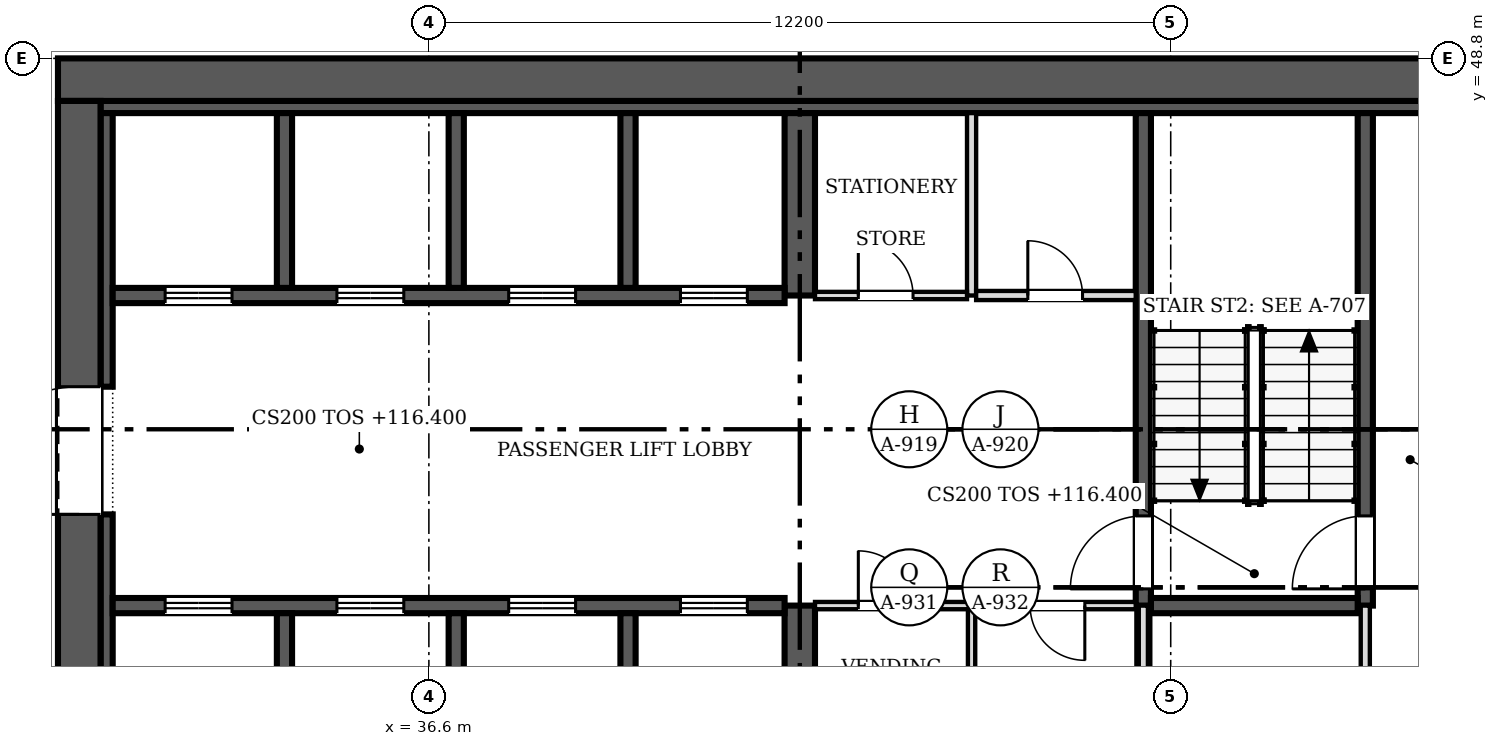
"""IFC4 building model, lengths in metres.
Left out: names, types, materials, properties, quantities, classifications, styles, units other than length and angle.
Written with IfcOpenShell. Run it as: python <this file> out.ifc"""

import sys

from ifc_helpers import new_model, si_unit, direction, frame, frame_2d, origin, place, context, subcontext, project, spatial, rectangle, extrude, source, transform, mapped, element, fill, save


model = new_model("IFC4")
c1 = context("Model", 3, precision=1e-05, world=origin(), true_north=direction((0.0, 1.0)))
c2 = subcontext(c1, "Body", "Model", "MODEL_VIEW")
j1 = project(units=[si_unit("LENGTHUNIT", "METRE"), si_unit("PLANEANGLEUNIT", "RADIAN")], contexts=[c1])
p1 = place(None, origin())
s1 = spatial("IfcSite", under=j1, at=p1, CompositionType="ELEMENT")
p2 = place(p1, origin())
s2 = spatial("IfcBuilding", under=s1, at=p2, CompositionType="ELEMENT")
p3 = place(p2, frame((0.0, 0.0, 116.4)))
s3 = spatial("IfcBuildingStorey", under=s2, at=p3, CompositionType="ELEMENT", Elevation=116.4)
p4 = place(p3, frame((30.85, 25.1, 0.0), z_axis=(0.0, 0.0, 1.0), x_axis=(0.0, 1.0, 0.0)))
e1 = element("IfcWall", 1, at=p4, inside=s3, PredefinedType="SHEAR", context=c2, shape_type="SweptSolid", body=[
    extrude(rectangle(XDim=23.0, YDim=0.7, at=frame_2d((11.5, 0.0))), origin(), (0.0, 0.0, 1.0), 3.8),
])
m1 = source(origin(), c2, "Body", "SweptSolid", [
    extrude(rectangle(XDim=2.1, YDim=2.4, at=frame_2d((1.05, 1.2))), frame((0.0, 0.36, 0.0), z_axis=(0.0, -1.0, 0.0), x_axis=(1.0, 0.0, 0.0)), (0.0, 0.0, 1.0), 0.72),
])
p5 = place(p4, frame((4.7, 0.0, 0.0)))
e2 = element("IfcOpeningElement", 2, at=p5, cuts=e1, PredefinedType="OPENING", context=c2, shape_type="MappedRepresentation", body=[
    mapped(m1, transform((0.0, 0.0, 0.0), scale=1.0)),
])
p6 = place(p4, frame((16.2, 0.0, 0.0)))
e3 = element("IfcOpeningElement", 3, at=p6, cuts=e1, PredefinedType="OPENING", context=c2, shape_type="MappedRepresentation", body=[
    mapped(m1, transform((0.0, 0.0, 0.0), scale=1.0)),
])
p7 = place(p3, frame((30.5, 48.45, 0.0), z_axis=(0.0, 0.0, 1.0), x_axis=(1.0, 0.0, 0.0)))
e4 = element("IfcWall", 4, at=p7, inside=s3, PredefinedType="SHEAR", context=c2, shape_type="SweptSolid", body=[
    extrude(rectangle(XDim=24.4, YDim=0.7, at=frame_2d((12.2, 0.0))), origin(), (0.0, 0.0, 1.0), 3.8),
])
p8 = place(p3, frame((31.2, 48.0, 0.0), z_axis=(0.0, 0.0, 1.0), x_axis=(1.0, 0.0, 0.0)))
e5 = element("IfcWall", 5, at=p8, inside=s3, PredefinedType="SOLIDWALL", context=c2, shape_type="SweptSolid", body=[
    extrude(rectangle(XDim=23.0, YDim=0.2, at=frame_2d((11.5, 0.0))), origin(), (0.0, 0.0, 1.0), 3.8),
])
p9 = place(p3, frame((31.3, 31.9, 0.0), z_axis=(0.0, 0.0, 1.0), x_axis=(0.0, 1.0, 0.0)))
e6 = element("IfcWall", 6, at=p9, inside=s3, PredefinedType="SOLIDWALL", context=c2, shape_type="SweptSolid", body=[
    extrude(rectangle(XDim=9.4, YDim=0.2, at=frame_2d((4.7, 0.0))), origin(), (0.0, 0.0, 1.0), 3.8),
])
p10 = place(p3, frame((31.3, 43.4, 0.0), z_axis=(0.0, 0.0, 1.0), x_axis=(0.0, 1.0, 0.0)))
e7 = element("IfcWall", 7, at=p10, inside=s3, PredefinedType="SOLIDWALL", context=c2, shape_type="SweptSolid", body=[
    extrude(rectangle(XDim=4.5, YDim=0.2, at=frame_2d((2.25, 0.0))), origin(), (0.0, 0.0, 1.0), 3.8),
])
p11 = place(p3, frame((42.7, 36.85, 0.0), z_axis=(0.0, 0.0, 1.0), x_axis=(0.0, 1.0, 0.0)))
e8 = element("IfcWall", 8, at=p11, inside=s3, PredefinedType="SHEAR", context=c2, shape_type="SweptSolid", body=[
    extrude(rectangle(XDim=2.95, YDim=0.5, at=frame_2d((1.475, 0.0))), origin(), (0.0, 0.0, 1.0), 3.8),
])
p12 = place(p3, frame((42.7, 44.9, 0.0), z_axis=(0.0, 0.0, 1.0), x_axis=(0.0, 1.0, 0.0)))
e9 = element("IfcWall", 9, at=p12, inside=s3, PredefinedType="SHEAR", context=c2, shape_type="SweptSolid", body=[
    extrude(rectangle(XDim=3.0, YDim=0.5, at=frame_2d((1.5, 0.0))), origin(), (0.0, 0.0, 1.0), 3.8),
])
p13 = place(p3, frame((31.4, 39.8, 0.0), z_axis=(0.0, 0.0, 1.0), x_axis=(1.0, 0.0, 0.0)))
e10 = element("IfcWall", 10, at=p13, inside=s3, PredefinedType="SOLIDWALL", context=c2, shape_type="SweptSolid", body=[
    extrude(rectangle(XDim=11.05, YDim=0.25, at=frame_2d((5.525, 0.0))), origin(), (0.0, 0.0, 1.0), 3.8),
])
m2 = source(origin(), c2, "Body", "SweptSolid", [
    extrude(rectangle(XDim=1.1, YDim=2.1, at=frame_2d((0.55, 1.05))), frame((0.0, 0.135, 0.0), z_axis=(0.0, -1.0, 0.0), x_axis=(1.0, 0.0, 0.0)), (0.0, 0.0, 1.0), 0.27),
])
p14 = place(p13, frame((0.863, 0.0, 0.0)))
e11 = element("IfcOpeningElement", 11, at=p14, cuts=e10, PredefinedType="OPENING", context=c2, shape_type="MappedRepresentation", body=[
    mapped(m2, transform((0.0, 0.0, 0.0), scale=1.0)),
])
p15 = place(p13, frame((3.688, 0.0, 0.0)))
e12 = element("IfcOpeningElement", 12, at=p15, cuts=e10, PredefinedType="OPENING", context=c2, shape_type="MappedRepresentation", body=[
    mapped(m2, transform((0.0, 0.0, 0.0), scale=1.0)),
])
p16 = place(p13, frame((6.512, 0.0, 0.0)))
e13 = element("IfcOpeningElement", 13, at=p16, cuts=e10, PredefinedType="OPENING", context=c2, shape_type="MappedRepresentation", body=[
    mapped(m2, transform((0.0, 0.0, 0.0), scale=1.0)),
])
p17 = place(p13, frame((9.337, 0.0, 0.0)))
e14 = element("IfcOpeningElement", 14, at=p17, cuts=e10, PredefinedType="OPENING", context=c2, shape_type="MappedRepresentation", body=[
    mapped(m2, transform((0.0, 0.0, 0.0), scale=1.0)),
])
p18 = place(p3, frame((42.45, 44.9, 0.0), z_axis=(0.0, 0.0, 1.0), x_axis=(-1.0, 0.0, 0.0)))
e15 = element("IfcWall", 15, at=p18, inside=s3, PredefinedType="SOLIDWALL", context=c2, shape_type="SweptSolid", body=[
    extrude(rectangle(XDim=11.05, YDim=0.25, at=frame_2d((5.525, 0.0))), origin(), (0.0, 0.0, 1.0), 3.8),
])
p19 = place(p18, frame((9.087, 0.0, 0.0)))
e16 = element("IfcOpeningElement", 16, at=p19, cuts=e15, PredefinedType="OPENING", context=c2, shape_type="MappedRepresentation", body=[
    mapped(m2, transform((0.0, 0.0, 0.0), scale=1.0)),
])
p20 = place(p18, frame((6.262, 0.0, 0.0)))
e17 = element("IfcOpeningElement", 17, at=p20, cuts=e15, PredefinedType="OPENING", context=c2, shape_type="MappedRepresentation", body=[
    mapped(m2, transform((0.0, 0.0, 0.0), scale=1.0)),
])
p21 = place(p18, frame((3.438, 0.0, 0.0)))
e18 = element("IfcOpeningElement", 18, at=p21, cuts=e15, PredefinedType="OPENING", context=c2, shape_type="MappedRepresentation", body=[
    mapped(m2, transform((0.0, 0.0, 0.0), scale=1.0)),
])
p22 = place(p18, frame((0.613, 0.0, 0.0)))
e19 = element("IfcOpeningElement", 19, at=p22, cuts=e15, PredefinedType="OPENING", context=c2, shape_type="MappedRepresentation", body=[
    mapped(m2, transform((0.0, 0.0, 0.0), scale=1.0)),
])
p23 = place(p3, frame((48.35, 47.9, 0.0), z_axis=(0.0, 0.0, 1.0), x_axis=(0.0, -1.0, 0.0)))
e20 = element("IfcWall", 20, at=p23, inside=s3, PredefinedType="SOLIDWALL", context=c2, shape_type="SweptSolid", body=[
    extrude(rectangle(XDim=8.1, YDim=0.25, at=frame_2d((4.05, 0.0))), origin(), (0.0, 0.0, 1.0), 3.8),
])
m3 = source(origin(), c2, "Body", "SweptSolid", [
    extrude(rectangle(XDim=1.2, YDim=2.1, at=frame_2d((0.6, 1.05))), frame((0.0, 0.135, 0.0), z_axis=(0.0, -1.0, 0.0), x_axis=(1.0, 0.0, 0.0)), (0.0, 0.0, 1.0), 0.27),
])
p24 = place(p23, frame((6.625, 0.0, 0.0)))
e21 = element("IfcOpeningElement", 21, at=p24, cuts=e20, PredefinedType="OPENING", context=c2, shape_type="MappedRepresentation", body=[
    mapped(m3, transform((0.0, 0.0, 0.0), scale=1.0)),
])
p25 = place(p3, frame((52.0, 39.8, 0.0), z_axis=(0.0, 0.0, 1.0), x_axis=(0.0, 1.0, 0.0)))
e22 = element("IfcWall", 22, at=p25, inside=s3, PredefinedType="SOLIDWALL", context=c2, shape_type="SweptSolid", body=[
    extrude(rectangle(XDim=8.1, YDim=0.25, at=frame_2d((4.05, 0.0))), origin(), (0.0, 0.0, 1.0), 3.8),
])
p26 = place(p25, frame((0.275, 0.0, 0.0)))
e23 = element("IfcOpeningElement", 23, at=p26, cuts=e22, PredefinedType="OPENING", context=c2, shape_type="MappedRepresentation", body=[
    mapped(m3, transform((0.0, 0.0, 0.0), scale=1.0)),
])
p27 = place(p3, frame((48.475, 39.8, 0.0), z_axis=(0.0, 0.0, 1.0), x_axis=(1.0, 0.0, 0.0)))
e24 = element("IfcWall", 24, at=p27, inside=s3, PredefinedType="SOLIDWALL", context=c2, shape_type="SweptSolid", body=[
    extrude(rectangle(XDim=3.4, YDim=0.25, at=frame_2d((1.7, 0.0))), origin(), (0.0, 0.0, 1.0), 3.8),
])
for number, where, z_axis, x_axis in (
    (25, (34.225, 36.85, 0.0), (0.0, 0.0, 1.0), (0.0, 1.0, 0.0)),
    (26, (37.05, 36.85, 0.0), (0.0, 0.0, 1.0), (0.0, 1.0, 0.0)),
    (27, (39.875, 36.85, 0.0), (0.0, 0.0, 1.0), (0.0, 1.0, 0.0)),
):
    element("IfcWall", number, at=place(p3, frame(where, z_axis=z_axis, x_axis=x_axis)), inside=s3, PredefinedType="SOLIDWALL", context=c2, shape_type="SweptSolid", body=[
        extrude(rectangle(XDim=2.825, YDim=0.25, at=frame_2d((1.413, 0.0))), origin(), (0.0, 0.0, 1.0), 3.8),
    ])
for number, where, z_axis, x_axis in (
    (28, (34.225, 45.025, 0.0), (0.0, 0.0, 1.0), (0.0, 1.0, 0.0)),
    (29, (37.05, 45.025, 0.0), (0.0, 0.0, 1.0), (0.0, 1.0, 0.0)),
    (30, (39.875, 45.025, 0.0), (0.0, 0.0, 1.0), (0.0, 1.0, 0.0)),
):
    element("IfcWall", number, at=place(p3, frame(where, z_axis=z_axis, x_axis=x_axis)), inside=s3, PredefinedType="SOLIDWALL", context=c2, shape_type="SweptSolid", body=[
        extrude(rectangle(XDim=2.875, YDim=0.25, at=frame_2d((1.438, 0.0))), origin(), (0.0, 0.0, 1.0), 3.8),
    ])
p28 = place(p3, frame((52.0, 33.525, 0.0), z_axis=(0.0, 0.0, 1.0), x_axis=(0.0, 1.0, 0.0)))
e31 = element("IfcWall", 31, at=p28, inside=s3, PredefinedType="PARTITIONING", context=c2, shape_type="SweptSolid", body=[
    extrude(rectangle(XDim=6.275, YDim=0.15, at=frame_2d((3.138, 0.0))), origin(), (0.0, 0.0, 1.0), 3.6),
])
m4 = source(origin(), c2, "Body", "SweptSolid", [
    extrude(rectangle(XDim=0.9, YDim=2.1, at=frame_2d((0.45, 1.05))), frame((0.0, 0.085, 0.0), z_axis=(0.0, -1.0, 0.0), x_axis=(1.0, 0.0, 0.0)), (0.0, 0.0, 1.0), 0.17),
])
p29 = place(p28, frame((1.025, 0.0, 0.0)))
e32 = element("IfcOpeningElement", 32, at=p29, cuts=e31, PredefinedType="OPENING", context=c2, shape_type="MappedRepresentation", body=[
    mapped(m4, transform((0.0, 0.0, 0.0), scale=1.0)),
])
p30 = place(p3, frame((48.225, 39.8, 0.0), z_axis=(0.0, 0.0, 1.0), x_axis=(-1.0, 0.0, 0.0)))
e33 = element("IfcWall", 33, at=p30, inside=s3, PredefinedType="PARTITIONING", context=c2, shape_type="SweptSolid", body=[
    extrude(rectangle(XDim=5.275, YDim=0.12, at=frame_2d((2.638, 0.0))), origin(), (0.0, 0.0, 1.0), 3.6),
])
m5 = source(origin(), c2, "Body", "SweptSolid", [
    extrude(rectangle(XDim=0.9, YDim=2.1, at=frame_2d((0.45, 1.05))), frame((0.0, 0.07, 0.0), z_axis=(0.0, -1.0, 0.0), x_axis=(1.0, 0.0, 0.0)), (0.0, 0.0, 1.0), 0.14),
])
p31 = place(p30, frame((3.663, 0.0, 0.0)))
e34 = element("IfcOpeningElement", 34, at=p31, cuts=e33, PredefinedType="OPENING", context=c2, shape_type="MappedRepresentation", body=[
    mapped(m5, transform((0.0, 0.0, 0.0), scale=1.0)),
])
p32 = place(p30, frame((0.837, 0.0, 0.0)))
e35 = element("IfcOpeningElement", 35, at=p32, cuts=e33, PredefinedType="OPENING", context=c2, shape_type="MappedRepresentation", body=[
    mapped(m5, transform((0.0, 0.0, 0.0), scale=1.0)),
])
p33 = place(p3, frame((45.525, 36.85, 0.0), z_axis=(0.0, 0.0, 1.0), x_axis=(0.0, 1.0, 0.0)))
e36 = element("IfcWall", 36, at=p33, inside=s3, PredefinedType="PARTITIONING", context=c2, shape_type="SweptSolid", body=[
    extrude(rectangle(XDim=2.89, YDim=0.12, at=frame_2d((1.445, 0.0))), origin(), (0.0, 0.0, 1.0), 3.6),
])
p34 = place(p3, frame((48.35, 36.85, 0.0), z_axis=(0.0, 0.0, 1.0), x_axis=(0.0, 1.0, 0.0)))
e37 = element("IfcWall", 37, at=p34, inside=s3, PredefinedType="PARTITIONING", context=c2, shape_type="SweptSolid", body=[
    extrude(rectangle(XDim=2.95, YDim=0.15, at=frame_2d((1.475, 0.0))), origin(), (0.0, 0.0, 1.0), 3.6),
])
p35 = place(p3, frame((45.525, 44.9, 0.0), z_axis=(0.0, 0.0, 1.0), x_axis=(0.0, 1.0, 0.0)))
e38 = element("IfcWall", 38, at=p35, inside=s3, PredefinedType="PARTITIONING", context=c2, shape_type="SweptSolid", body=[
    extrude(rectangle(XDim=3.0, YDim=0.15, at=frame_2d((1.5, 0.0))), origin(), (0.0, 0.0, 1.0), 3.6),
])
p36 = place(p3, frame((42.95, 44.9, 0.0), z_axis=(0.0, 0.0, 1.0), x_axis=(1.0, 0.0, 0.0)))
e39 = element("IfcWall", 39, at=p36, inside=s3, PredefinedType="PARTITIONING", context=c2, shape_type="SweptSolid", body=[
    extrude(rectangle(XDim=2.5, YDim=0.12, at=frame_2d((1.25, 0.0))), origin(), (0.0, 0.0, 1.0), 3.6),
])
p37 = place(p36, frame((0.712, 0.0, 0.0)))
e40 = element("IfcOpeningElement", 40, at=p37, cuts=e39, PredefinedType="OPENING", context=c2, shape_type="MappedRepresentation", body=[
    mapped(m5, transform((0.0, 0.0, 0.0), scale=1.0)),
])
p38 = place(p3, frame((45.6, 44.9, 0.0), z_axis=(0.0, 0.0, 1.0), x_axis=(1.0, 0.0, 0.0)))
e41 = element("IfcWall", 41, at=p38, inside=s3, PredefinedType="PARTITIONING", context=c2, shape_type="SweptSolid", body=[
    extrude(rectangle(XDim=2.625, YDim=0.15, at=frame_2d((1.312, 0.0))), origin(), (0.0, 0.0, 1.0), 3.6),
])
p39 = place(p38, frame((0.85, 0.0, 0.0)))
e42 = element("IfcOpeningElement", 42, at=p39, cuts=e41, PredefinedType="OPENING", context=c2, shape_type="MappedRepresentation", body=[
    mapped(m4, transform((0.0, 0.0, 0.0), scale=1.0)),
])
m6 = source(origin(), c2, "Body", "SweptSolid", [
    extrude(rectangle(XDim=2.1, YDim=2.4, at=frame_2d((1.05, 1.2))), frame((0.0, 0.025, 0.0), z_axis=(0.0, -1.0, 0.0), x_axis=(1.0, 0.0, 0.0)), (0.0, 0.0, 1.0), 0.05),
])
p40 = place(p6, origin())
e43 = element("IfcDoor", 43, at=p40, inside=s3, OperationType="DOUBLE_DOOR_SINGLE_SWING", PredefinedType="DOOR", context=c2, shape_type="MappedRepresentation", body=[
    mapped(m6, transform((0.0, 0.0, 0.0), scale=1.0)),
])
fill(e3, e43)
m7 = source(origin(), c2, "Body", "SweptSolid", [
    extrude(rectangle(XDim=1.1, YDim=2.1, at=frame_2d((0.55, 1.05))), frame((0.0, 0.025, 0.0), z_axis=(0.0, -1.0, 0.0), x_axis=(1.0, 0.0, 0.0)), (0.0, 0.0, 1.0), 0.05),
])
p41 = place(p14, origin())
e44 = element("IfcDoor", 44, at=p41, inside=s3, OperationType="DOUBLE_DOOR_SLIDING", PredefinedType="DOOR", context=c2, shape_type="MappedRepresentation", body=[
    mapped(m7, transform((0.0, 0.0, 0.0), scale=1.0)),
])
fill(e11, e44)
p42 = place(p15, origin())
e45 = element("IfcDoor", 45, at=p42, inside=s3, OperationType="DOUBLE_DOOR_SLIDING", PredefinedType="DOOR", context=c2, shape_type="MappedRepresentation", body=[
    mapped(m7, transform((0.0, 0.0, 0.0), scale=1.0)),
])
fill(e12, e45)
p43 = place(p16, origin())
e46 = element("IfcDoor", 46, at=p43, inside=s3, OperationType="DOUBLE_DOOR_SLIDING", PredefinedType="DOOR", context=c2, shape_type="MappedRepresentation", body=[
    mapped(m7, transform((0.0, 0.0, 0.0), scale=1.0)),
])
fill(e13, e46)
p44 = place(p17, origin())
e47 = element("IfcDoor", 47, at=p44, inside=s3, OperationType="DOUBLE_DOOR_SLIDING", PredefinedType="DOOR", context=c2, shape_type="MappedRepresentation", body=[
    mapped(m7, transform((0.0, 0.0, 0.0), scale=1.0)),
])
fill(e14, e47)
p45 = place(p19, origin())
e48 = element("IfcDoor", 48, at=p45, inside=s3, OperationType="DOUBLE_DOOR_SLIDING", PredefinedType="DOOR", context=c2, shape_type="MappedRepresentation", body=[
    mapped(m7, transform((0.0, 0.0, 0.0), scale=1.0)),
])
fill(e16, e48)
p46 = place(p20, origin())
e49 = element("IfcDoor", 49, at=p46, inside=s3, OperationType="DOUBLE_DOOR_SLIDING", PredefinedType="DOOR", context=c2, shape_type="MappedRepresentation", body=[
    mapped(m7, transform((0.0, 0.0, 0.0), scale=1.0)),
])
fill(e17, e49)
p47 = place(p21, origin())
e50 = element("IfcDoor", 50, at=p47, inside=s3, OperationType="DOUBLE_DOOR_SLIDING", PredefinedType="DOOR", context=c2, shape_type="MappedRepresentation", body=[
    mapped(m7, transform((0.0, 0.0, 0.0), scale=1.0)),
])
fill(e18, e50)
p48 = place(p22, origin())
e51 = element("IfcDoor", 51, at=p48, inside=s3, OperationType="DOUBLE_DOOR_SLIDING", PredefinedType="DOOR", context=c2, shape_type="MappedRepresentation", body=[
    mapped(m7, transform((0.0, 0.0, 0.0), scale=1.0)),
])
fill(e19, e51)
m8 = source(origin(), c2, "Body", "SweptSolid", [
    extrude(rectangle(XDim=1.2, YDim=2.1, at=frame_2d((0.6, 1.05))), frame((0.0, 0.025, 0.0), z_axis=(0.0, -1.0, 0.0), x_axis=(1.0, 0.0, 0.0)), (0.0, 0.0, 1.0), 0.05),
])
p49 = place(p24, origin())
e52 = element("IfcDoor", 52, at=p49, inside=s3, OperationType="SINGLE_SWING_RIGHT", PredefinedType="DOOR", context=c2, shape_type="MappedRepresentation", body=[
    mapped(m8, transform((0.0, 0.0, 0.0), scale=1.0)),
])
fill(e21, e52)
p50 = place(p26, origin())
e53 = element("IfcDoor", 53, at=p50, inside=s3, OperationType="SINGLE_SWING_LEFT", PredefinedType="DOOR", context=c2, shape_type="MappedRepresentation", body=[
    mapped(m8, transform((0.0, 0.0, 0.0), scale=1.0)),
])
fill(e23, e53)
m9 = source(origin(), c2, "Body", "SweptSolid", [
    extrude(rectangle(XDim=0.9, YDim=2.1, at=frame_2d((0.45, 1.05))), frame((0.0, 0.025, 0.0), z_axis=(0.0, -1.0, 0.0), x_axis=(1.0, 0.0, 0.0)), (0.0, 0.0, 1.0), 0.05),
])
p51 = place(p31, origin())
e54 = element("IfcDoor", 54, at=p51, inside=s3, OperationType="SINGLE_SWING_RIGHT", PredefinedType="DOOR", context=c2, shape_type="MappedRepresentation", body=[
    mapped(m9, transform((0.0, 0.0, 0.0), scale=1.0)),
])
fill(e34, e54)
p52 = place(p32, origin())
e55 = element("IfcDoor", 55, at=p52, inside=s3, OperationType="SINGLE_SWING_LEFT", PredefinedType="DOOR", context=c2, shape_type="MappedRepresentation", body=[
    mapped(m9, transform((0.0, 0.0, 0.0), scale=1.0)),
])
fill(e35, e55)
p53 = place(p37, origin())
e56 = element("IfcDoor", 56, at=p53, inside=s3, OperationType="SINGLE_SWING_LEFT", PredefinedType="DOOR", context=c2, shape_type="MappedRepresentation", body=[
    mapped(m9, transform((0.0, 0.0, 0.0), scale=1.0)),
])
fill(e40, e56)
p54 = place(p39, origin())
e57 = element("IfcDoor", 57, at=p54, inside=s3, OperationType="SINGLE_SWING_LEFT", PredefinedType="DOOR", context=c2, shape_type="MappedRepresentation", body=[
    mapped(m9, transform((0.0, 0.0, 0.0), scale=1.0)),
])
fill(e42, e57)
save(model, sys.argv[1])
